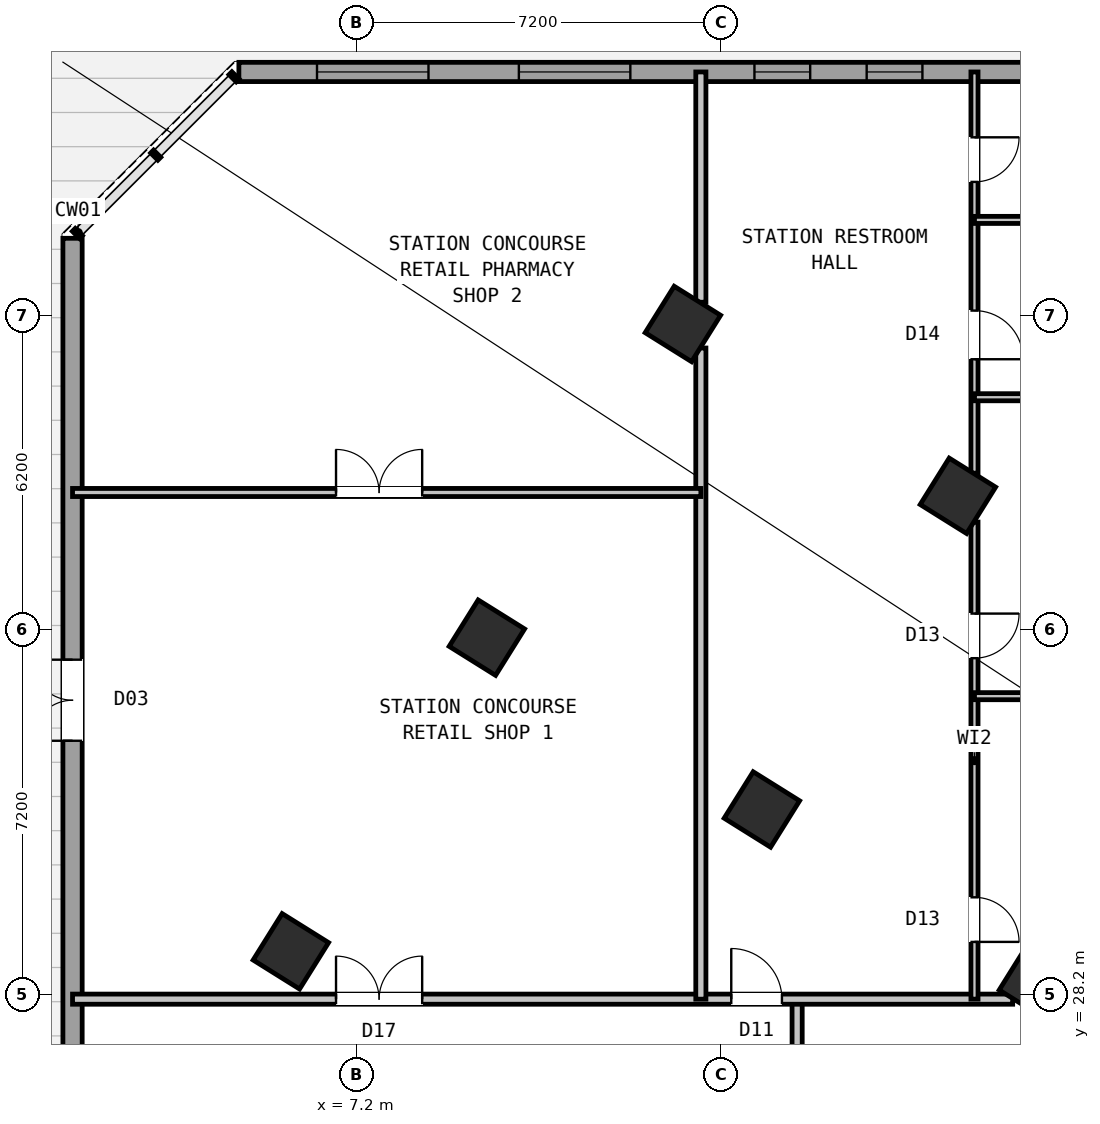
"""IFC4 building model, lengths in metres.
Left out: names, types, materials, properties, quantities, classifications, styles, units other than length and angle.
Written with IfcOpenShell. Run it as: python <this file> out.ifc"""

import sys

from ifc_helpers import new_model, si_unit, direction, frame, frame_2d, origin, origin_2d, place, context, subcontext, project, spatial, rectangle, hollow_rectangle, extrude, source, transform, mapped, element, fill, save


model = new_model("IFC4")
c1 = context("Model", 3, precision=1e-05, world=origin(), true_north=direction((0.0, 1.0)))
c2 = subcontext(c1, "Body", "Model", "MODEL_VIEW")
j1 = project(units=[si_unit("LENGTHUNIT", "METRE"), si_unit("PLANEANGLEUNIT", "RADIAN")], contexts=[c1])
p1 = place(None, origin())
s1 = spatial("IfcSite", under=j1, at=p1, CompositionType="ELEMENT")
p2 = place(p1, origin())
s2 = spatial("IfcBuilding", under=s1, at=p2, CompositionType="ELEMENT")
p3 = place(p2, origin())
s3 = spatial("IfcBuildingStorey", under=s2, at=p3, CompositionType="ELEMENT", Elevation=0.0)
m1 = source(origin(), c2, "Body", "SweptSolid", [
    extrude(hollow_rectangle(XDim=1.08, YDim=1.08, WallThickness=0.04, at=origin_2d()), origin(), (0.0, 0.0, 1.0), 5.4),
])
for number, where, z_axis, x_axis in (
    (1, (20.632, 28.452, 0.0), (0.0, 0.0, 1.0), (-0.848, 0.53, 0.0)),
    (2, (19.073, 38.034, 0.0), (0.0, 0.0, 1.0), (-0.848, 0.53, 0.0)),
    (3, (15.205, 31.844, 0.0), (0.0, 0.0, 1.0), (-0.848, 0.53, 0.0)),
    (4, (13.646, 41.426, 0.0), (0.0, 0.0, 1.0), (-0.848, 0.53, 0.0)),
    (5, (9.777, 35.235, 0.0), (0.0, 0.0, 1.0), (-0.848, 0.53, 0.0)),
    (6, (5.909, 29.044, 0.0), (0.0, 0.0, 1.0), (-0.848, 0.53, 0.0)),
):
    element("IfcColumn", number, at=place(p3, frame(where, z_axis=z_axis, x_axis=x_axis)), inside=s3, PredefinedType="COLUMN", context=c2, shape_type="MappedRepresentation", body=[
        mapped(m1, transform((0.0, 0.0, 0.0), scale=1.0)),
    ])
p4 = place(p3, frame((1.6, 4.883, 0.0), z_axis=(0.0, 0.0, 1.0), x_axis=(0.0, 1.0, 0.0)))
e7 = element("IfcWall", 7, at=p4, inside=s3, PredefinedType="STANDARD", context=c2, shape_type="SweptSolid", body=[
    extrude(rectangle(XDim=38.234, YDim=0.38, at=frame_2d((19.117, 0.0))), origin(), (0.0, 0.0, 1.0), 5.05),
])
p5 = place(p4, frame((16.617, 0.0, 0.0)))
e8 = element("IfcOpeningElement", 8, at=p5, cuts=e7, PredefinedType="OPENING", context=c2, shape_type="SweptSolid", body=[
    extrude(rectangle(XDim=2.2, YDim=2.6, at=frame_2d((1.1, 1.3))), frame((0.0, 0.2, 0.0), z_axis=(0.0, -1.0, 0.0), x_axis=(1.0, 0.0, 0.0)), (0.0, 0.0, 1.0), 0.4),
])
p6 = place(p4, frame((28.317, 0.0, 0.0)))
e9 = element("IfcOpeningElement", 9, at=p6, cuts=e7, PredefinedType="OPENING", context=c2, shape_type="SweptSolid", body=[
    extrude(rectangle(XDim=1.6, YDim=2.4, at=frame_2d((0.8, 1.2))), frame((0.0, 0.2, 0.0), z_axis=(0.0, -1.0, 0.0), x_axis=(1.0, 0.0, 0.0)), (0.0, 0.0, 1.0), 0.4),
])
p7 = place(p3, frame((4.883, 46.4, 0.0), z_axis=(0.0, 0.0, 1.0), x_axis=(1.0, 0.0, 0.0)))
e10 = element("IfcWall", 10, at=p7, inside=s3, PredefinedType="STANDARD", context=c2, shape_type="SweptSolid", body=[
    extrude(rectangle(XDim=62.234, YDim=0.38, at=frame_2d((31.117, 0.0))), origin(), (0.0, 0.0, 1.0), 5.05),
])
p8 = place(p7, frame((1.542, 0.0, 0.85)))
e11 = element("IfcOpeningElement", 11, at=p8, cuts=e10, PredefinedType="OPENING", context=c2, shape_type="SweptSolid", body=[
    extrude(rectangle(XDim=2.2, YDim=1.75, at=frame_2d((1.1, 0.875))), frame((0.0, 0.2, 0.0), z_axis=(0.0, -1.0, 0.0), x_axis=(1.0, 0.0, 0.0)), (0.0, 0.0, 1.0), 0.4),
])
p9 = place(p7, frame((5.525, 0.0, 0.85)))
e12 = element("IfcOpeningElement", 12, at=p9, cuts=e10, PredefinedType="OPENING", context=c2, shape_type="SweptSolid", body=[
    extrude(rectangle(XDim=2.2, YDim=1.75, at=frame_2d((1.1, 0.875))), frame((0.0, 0.2, 0.0), z_axis=(0.0, -1.0, 0.0), x_axis=(1.0, 0.0, 0.0)), (0.0, 0.0, 1.0), 0.4),
])
p10 = place(p7, frame((10.175, 0.0, 1.0)))
e13 = element("IfcOpeningElement", 13, at=p10, cuts=e10, PredefinedType="OPENING", context=c2, shape_type="SweptSolid", body=[
    extrude(rectangle(XDim=1.1, YDim=1.35, at=frame_2d((0.55, 0.675))), frame((0.0, 0.2, 0.0), z_axis=(0.0, -1.0, 0.0), x_axis=(1.0, 0.0, 0.0)), (0.0, 0.0, 1.0), 0.4),
])
p11 = place(p7, frame((12.39, 0.0, 1.0)))
e14 = element("IfcOpeningElement", 14, at=p11, cuts=e10, PredefinedType="OPENING", context=c2, shape_type="SweptSolid", body=[
    extrude(rectangle(XDim=1.1, YDim=1.35, at=frame_2d((0.55, 0.675))), frame((0.0, 0.2, 0.0), z_axis=(0.0, -1.0, 0.0), x_axis=(1.0, 0.0, 0.0)), (0.0, 0.0, 1.0), 0.4),
])
p12 = place(p7, frame((15.57, 0.0, 0.95)))
e15 = element("IfcOpeningElement", 15, at=p12, cuts=e10, PredefinedType="OPENING", context=c2, shape_type="SweptSolid", body=[
    extrude(rectangle(XDim=1.4, YDim=1.5, at=frame_2d((0.7, 0.75))), frame((0.0, 0.2, 0.0), z_axis=(0.0, -1.0, 0.0), x_axis=(1.0, 0.0, 0.0)), (0.0, 0.0, 1.0), 0.4),
])
p13 = place(p7, frame((18.135, 0.0, 0.95)))
e16 = element("IfcOpeningElement", 16, at=p13, cuts=e10, PredefinedType="OPENING", context=c2, shape_type="SweptSolid", body=[
    extrude(rectangle(XDim=1.4, YDim=1.5, at=frame_2d((0.7, 0.75))), frame((0.0, 0.2, 0.0), z_axis=(0.0, -1.0, 0.0), x_axis=(1.0, 0.0, 0.0)), (0.0, 0.0, 1.0), 0.4),
])
p14 = place(p7, frame((21.857, 0.0, 0.85)))
e17 = element("IfcOpeningElement", 17, at=p14, cuts=e10, PredefinedType="OPENING", context=c2, shape_type="SweptSolid", body=[
    extrude(rectangle(XDim=2.2, YDim=1.75, at=frame_2d((1.1, 0.875))), frame((0.0, 0.2, 0.0), z_axis=(0.0, -1.0, 0.0), x_axis=(1.0, 0.0, 0.0)), (0.0, 0.0, 1.0), 0.4),
])
p15 = place(p7, frame((25.535, 0.0, 0.85)))
e18 = element("IfcOpeningElement", 18, at=p15, cuts=e10, PredefinedType="OPENING", context=c2, shape_type="SweptSolid", body=[
    extrude(rectangle(XDim=2.2, YDim=1.75, at=frame_2d((1.1, 0.875))), frame((0.0, 0.2, 0.0), z_axis=(0.0, -1.0, 0.0), x_axis=(1.0, 0.0, 0.0)), (0.0, 0.0, 1.0), 0.4),
])
p16 = place(p7, frame((29.214, 0.0, 0.85)))
e19 = element("IfcOpeningElement", 19, at=p16, cuts=e10, PredefinedType="OPENING", context=c2, shape_type="SweptSolid", body=[
    extrude(rectangle(XDim=2.2, YDim=1.75, at=frame_2d((1.1, 0.875))), frame((0.0, 0.2, 0.0), z_axis=(0.0, -1.0, 0.0), x_axis=(1.0, 0.0, 0.0)), (0.0, 0.0, 1.0), 0.4),
])
p17 = place(p7, frame((32.893, 0.0, 0.85)))
e20 = element("IfcOpeningElement", 20, at=p17, cuts=e10, PredefinedType="OPENING", context=c2, shape_type="SweptSolid", body=[
    extrude(rectangle(XDim=2.2, YDim=1.75, at=frame_2d((1.1, 0.875))), frame((0.0, 0.2, 0.0), z_axis=(0.0, -1.0, 0.0), x_axis=(1.0, 0.0, 0.0)), (0.0, 0.0, 1.0), 0.4),
])
p18 = place(p7, frame((36.572, 0.0, 0.85)))
e21 = element("IfcOpeningElement", 21, at=p18, cuts=e10, PredefinedType="OPENING", context=c2, shape_type="SweptSolid", body=[
    extrude(rectangle(XDim=2.2, YDim=1.75, at=frame_2d((1.1, 0.875))), frame((0.0, 0.2, 0.0), z_axis=(0.0, -1.0, 0.0), x_axis=(1.0, 0.0, 0.0)), (0.0, 0.0, 1.0), 0.4),
])
p19 = place(p7, frame((40.251, 0.0, 0.85)))
e22 = element("IfcOpeningElement", 22, at=p19, cuts=e10, PredefinedType="OPENING", context=c2, shape_type="SweptSolid", body=[
    extrude(rectangle(XDim=2.2, YDim=1.75, at=frame_2d((1.1, 0.875))), frame((0.0, 0.2, 0.0), z_axis=(0.0, -1.0, 0.0), x_axis=(1.0, 0.0, 0.0)), (0.0, 0.0, 1.0), 0.4),
])
p20 = place(p7, frame((43.93, 0.0, 0.85)))
e23 = element("IfcOpeningElement", 23, at=p20, cuts=e10, PredefinedType="OPENING", context=c2, shape_type="SweptSolid", body=[
    extrude(rectangle(XDim=2.2, YDim=1.75, at=frame_2d((1.1, 0.875))), frame((0.0, 0.2, 0.0), z_axis=(0.0, -1.0, 0.0), x_axis=(1.0, 0.0, 0.0)), (0.0, 0.0, 1.0), 0.4),
])
p21 = place(p7, frame((47.608, 0.0, 0.85)))
e24 = element("IfcOpeningElement", 24, at=p21, cuts=e10, PredefinedType="OPENING", context=c2, shape_type="SweptSolid", body=[
    extrude(rectangle(XDim=2.2, YDim=1.75, at=frame_2d((1.1, 0.875))), frame((0.0, 0.2, 0.0), z_axis=(0.0, -1.0, 0.0), x_axis=(1.0, 0.0, 0.0)), (0.0, 0.0, 1.0), 0.4),
])
p22 = place(p7, frame((51.287, 0.0, 0.85)))
e25 = element("IfcOpeningElement", 25, at=p22, cuts=e10, PredefinedType="OPENING", context=c2, shape_type="SweptSolid", body=[
    extrude(rectangle(XDim=2.2, YDim=1.75, at=frame_2d((1.1, 0.875))), frame((0.0, 0.2, 0.0), z_axis=(0.0, -1.0, 0.0), x_axis=(1.0, 0.0, 0.0)), (0.0, 0.0, 1.0), 0.4),
])
p23 = place(p7, frame((54.966, 0.0, 0.85)))
e26 = element("IfcOpeningElement", 26, at=p23, cuts=e10, PredefinedType="OPENING", context=c2, shape_type="SweptSolid", body=[
    extrude(rectangle(XDim=2.2, YDim=1.75, at=frame_2d((1.1, 0.875))), frame((0.0, 0.2, 0.0), z_axis=(0.0, -1.0, 0.0), x_axis=(1.0, 0.0, 0.0)), (0.0, 0.0, 1.0), 0.4),
])
p24 = place(p7, frame((58.645, 0.0, 0.85)))
e27 = element("IfcOpeningElement", 27, at=p24, cuts=e10, PredefinedType="OPENING", context=c2, shape_type="SweptSolid", body=[
    extrude(rectangle(XDim=2.2, YDim=1.75, at=frame_2d((1.1, 0.875))), frame((0.0, 0.2, 0.0), z_axis=(0.0, -1.0, 0.0), x_axis=(1.0, 0.0, 0.0)), (0.0, 0.0, 1.0), 0.4),
])
p25 = place(p3, frame((15.9, 16.3, 0.0), z_axis=(0.0, 0.0, 1.0), x_axis=(0.0, 1.0, 0.0)))
e28 = element("IfcWall", 28, at=p25, inside=s3, PredefinedType="STANDARD", context=c2, shape_type="SweptSolid", body=[
    extrude(rectangle(XDim=11.8, YDim=0.2, at=frame_2d((5.9, 0.0))), origin(), (0.0, 0.0, 1.0), 5.04),
])
p26 = place(p25, frame((1.6, 0.0, 0.0)))
e29 = element("IfcOpeningElement", 29, at=p26, cuts=e28, PredefinedType="OPENING", context=c2, shape_type="SweptSolid", body=[
    extrude(rectangle(XDim=1.15, YDim=2.1, at=frame_2d((0.575, 1.05))), frame((0.0, 0.11, 0.0), z_axis=(0.0, -1.0, 0.0), x_axis=(1.0, 0.0, 0.0)), (0.0, 0.0, 1.0), 0.22),
])
p27 = place(p25, frame((7.0, 0.0, 0.0)))
e30 = element("IfcOpeningElement", 30, at=p27, cuts=e28, PredefinedType="OPENING", context=c2, shape_type="SweptSolid", body=[
    extrude(rectangle(XDim=1.4, YDim=2.15, at=frame_2d((0.7, 1.075))), frame((0.0, 0.11, 0.0), z_axis=(0.0, -1.0, 0.0), x_axis=(1.0, 0.0, 0.0)), (0.0, 0.0, 1.0), 0.22),
])
p28 = place(p3, frame((1.6, 28.1, 0.0), z_axis=(0.0, 0.0, 1.0), x_axis=(1.0, 0.0, 0.0)))
e31 = element("IfcWall", 31, at=p28, inside=s3, PredefinedType="STANDARD", context=c2, shape_type="SweptSolid", body=[
    extrude(rectangle(XDim=18.554, YDim=0.2, at=frame_2d((9.277, 0.0))), origin(), (0.0, 0.0, 1.0), 5.04),
])
p29 = place(p28, frame((5.2, 0.0, 0.0)))
e32 = element("IfcOpeningElement", 32, at=p29, cuts=e31, PredefinedType="OPENING", context=c2, shape_type="SweptSolid", body=[
    extrude(rectangle(XDim=1.7, YDim=2.2, at=frame_2d((0.85, 1.1))), frame((0.0, 0.11, 0.0), z_axis=(0.0, -1.0, 0.0), x_axis=(1.0, 0.0, 0.0)), (0.0, 0.0, 1.0), 0.22),
])
p30 = place(p28, frame((13.0, 0.0, 0.0)))
e33 = element("IfcOpeningElement", 33, at=p30, cuts=e31, PredefinedType="OPENING", context=c2, shape_type="SweptSolid", body=[
    extrude(rectangle(XDim=1.0, YDim=2.1, at=frame_2d((0.5, 1.05))), frame((0.0, 0.11, 0.0), z_axis=(0.0, -1.0, 0.0), x_axis=(1.0, 0.0, 0.0)), (0.0, 0.0, 1.0), 0.22),
])
p31 = place(p3, frame((14.0, 28.1, 0.0), z_axis=(0.0, 0.0, 1.0), x_axis=(0.0, 1.0, 0.0)))
e34 = element("IfcWall", 34, at=p31, inside=s3, PredefinedType="STANDARD", context=c2, shape_type="SweptSolid", body=[
    extrude(rectangle(XDim=12.852, YDim=0.2, at=frame_2d((6.426, 0.0))), origin(), (0.0, 0.0, 1.0), 5.04),
])
p32 = place(p3, frame((14.0, 41.855, 0.0), z_axis=(0.0, 0.0, 1.0), x_axis=(0.0, 1.0, 0.0)))
e35 = element("IfcWall", 35, at=p32, inside=s3, PredefinedType="STANDARD", context=c2, shape_type="SweptSolid", body=[
    extrude(rectangle(XDim=4.545, YDim=0.2, at=frame_2d((2.272, 0.0))), origin(), (0.0, 0.0, 1.0), 5.04),
])
p33 = place(p3, frame((1.6, 38.1, 0.0), z_axis=(0.0, 0.0, 1.0), x_axis=(1.0, 0.0, 0.0)))
e36 = element("IfcWall", 36, at=p33, inside=s3, PredefinedType="PARTITIONING", context=c2, shape_type="SweptSolid", body=[
    extrude(rectangle(XDim=12.4, YDim=0.16, at=frame_2d((6.2, 0.0))), origin(), (0.0, 0.0, 1.0), 5.04),
])
p34 = place(p33, frame((5.2, 0.0, 0.0)))
e37 = element("IfcOpeningElement", 37, at=p34, cuts=e36, PredefinedType="OPENING", context=c2, shape_type="SweptSolid", body=[
    extrude(rectangle(XDim=1.7, YDim=2.2, at=frame_2d((0.85, 1.1))), frame((0.0, 0.09, 0.0), z_axis=(0.0, -1.0, 0.0), x_axis=(1.0, 0.0, 0.0)), (0.0, 0.0, 1.0), 0.18),
])
p35 = place(p3, frame((19.4, 28.1, 0.0), z_axis=(0.0, 0.0, 1.0), x_axis=(0.0, 1.0, 0.0)))
e38 = element("IfcWall", 38, at=p35, inside=s3, PredefinedType="PLUMBINGWALL", context=c2, shape_type="SweptSolid", body=[
    extrude(rectangle(XDim=9.416, YDim=0.14, at=frame_2d((4.708, 0.0))), origin(), (0.0, 0.0, 1.0), 5.04),
])
p36 = place(p35, frame((1.13, 0.0, 0.0)))
e39 = element("IfcOpeningElement", 39, at=p36, cuts=e38, PredefinedType="OPENING", context=c2, shape_type="SweptSolid", body=[
    extrude(rectangle(XDim=0.88, YDim=2.08, at=frame_2d((0.44, 1.04))), frame((0.0, 0.08, 0.0), z_axis=(0.0, -1.0, 0.0), x_axis=(1.0, 0.0, 0.0)), (0.0, 0.0, 1.0), 0.16),
])
p37 = place(p35, frame((6.73, 0.0, 0.0)))
e40 = element("IfcOpeningElement", 40, at=p37, cuts=e38, PredefinedType="OPENING", context=c2, shape_type="SweptSolid", body=[
    extrude(rectangle(XDim=0.88, YDim=2.08, at=frame_2d((0.44, 1.04))), frame((0.0, 0.08, 0.0), z_axis=(0.0, -1.0, 0.0), x_axis=(1.0, 0.0, 0.0)), (0.0, 0.0, 1.0), 0.16),
])
p38 = place(p3, frame((19.4, 38.481, 0.0), z_axis=(0.0, 0.0, 1.0), x_axis=(0.0, 1.0, 0.0)))
e41 = element("IfcWall", 41, at=p38, inside=s3, PredefinedType="PLUMBINGWALL", context=c2, shape_type="SweptSolid", body=[
    extrude(rectangle(XDim=7.919, YDim=0.14, at=frame_2d((3.959, 0.0))), origin(), (0.0, 0.0, 1.0), 5.04),
])
p39 = place(p38, frame((2.249, 0.0, 0.0)))
e42 = element("IfcOpeningElement", 42, at=p39, cuts=e41, PredefinedType="OPENING", context=c2, shape_type="SweptSolid", body=[
    extrude(rectangle(XDim=0.96, YDim=2.08, at=frame_2d((0.48, 1.04))), frame((0.0, 0.08, 0.0), z_axis=(0.0, -1.0, 0.0), x_axis=(1.0, 0.0, 0.0)), (0.0, 0.0, 1.0), 0.16),
])
p40 = place(p38, frame((5.749, 0.0, 0.0)))
e43 = element("IfcOpeningElement", 43, at=p40, cuts=e41, PredefinedType="OPENING", context=c2, shape_type="SweptSolid", body=[
    extrude(rectangle(XDim=0.88, YDim=2.08, at=frame_2d((0.44, 1.04))), frame((0.0, 0.08, 0.0), z_axis=(0.0, -1.0, 0.0), x_axis=(1.0, 0.0, 0.0)), (0.0, 0.0, 1.0), 0.16),
])
p41 = place(p3, frame((19.4, 34.08, 0.0), z_axis=(0.0, 0.0, 1.0), x_axis=(1.0, 0.0, 0.0)))
e44 = element("IfcWall", 44, at=p41, inside=s3, PredefinedType="PLUMBINGWALL", context=c2, shape_type="SweptSolid", body=[
    extrude(rectangle(XDim=4.96, YDim=0.14, at=frame_2d((2.48, 0.0))), origin(), (0.0, 0.0, 1.0), 5.04),
])
for number, where, z_axis, x_axis in (
    (45, (19.4, 39.98, 0.0), (0.0, 0.0, 1.0), (1.0, 0.0, 0.0)),
    (46, (19.4, 43.48, 0.0), (0.0, 0.0, 1.0), (1.0, 0.0, 0.0)),
):
    element("IfcWall", number, at=place(p3, frame(where, z_axis=z_axis, x_axis=x_axis)), inside=s3, PredefinedType="PLUMBINGWALL", context=c2, shape_type="SweptSolid", body=[
        extrude(rectangle(XDim=6.1, YDim=0.14, at=frame_2d((3.05, 0.0))), origin(), (0.0, 0.0, 1.0), 5.04),
    ])
m2 = source(origin(), c2, "Body", "SweptSolid", [
    extrude(rectangle(XDim=1.6, YDim=2.4, at=frame_2d((0.8, 1.2))), frame((0.0, 0.025, 0.0), z_axis=(0.0, -1.0, 0.0), x_axis=(1.0, 0.0, 0.0)), (0.0, 0.0, 1.0), 0.05),
])
p42 = place(p6, origin())
e47 = element("IfcDoor", 47, at=p42, inside=s3, OperationType="DOUBLE_DOOR_SINGLE_SWING", PredefinedType="DOOR", context=c2, shape_type="MappedRepresentation", body=[
    mapped(m2, transform((0.0, 0.0, 0.0), scale=1.0)),
])
fill(e9, e47)
m3 = source(origin(), c2, "Body", "SweptSolid", [
    extrude(rectangle(XDim=2.2, YDim=1.75, at=frame_2d((1.1, 0.875))), frame((0.0, 0.03, 0.0), z_axis=(0.0, -1.0, 0.0), x_axis=(1.0, 0.0, 0.0)), (0.0, 0.0, 1.0), 0.06),
])
p43 = place(p8, origin())
e48 = element("IfcWindow", 48, at=p43, inside=s3, PartitioningType="SINGLE_PANEL", PredefinedType="WINDOW", context=c2, shape_type="MappedRepresentation", body=[
    mapped(m3, transform((0.0, 0.0, 0.0), scale=1.0)),
])
fill(e11, e48)
p44 = place(p9, origin())
e49 = element("IfcWindow", 49, at=p44, inside=s3, PartitioningType="SINGLE_PANEL", PredefinedType="WINDOW", context=c2, shape_type="MappedRepresentation", body=[
    mapped(m3, transform((0.0, 0.0, 0.0), scale=1.0)),
])
fill(e12, e49)
m4 = source(origin(), c2, "Body", "SweptSolid", [
    extrude(rectangle(XDim=1.1, YDim=1.35, at=frame_2d((0.55, 0.675))), frame((0.0, 0.03, 0.0), z_axis=(0.0, -1.0, 0.0), x_axis=(1.0, 0.0, 0.0)), (0.0, 0.0, 1.0), 0.06),
])
p45 = place(p10, origin())
e50 = element("IfcWindow", 50, at=p45, inside=s3, PartitioningType="SINGLE_PANEL", PredefinedType="WINDOW", context=c2, shape_type="MappedRepresentation", body=[
    mapped(m4, transform((0.0, 0.0, 0.0), scale=1.0)),
])
fill(e13, e50)
p46 = place(p11, origin())
e51 = element("IfcWindow", 51, at=p46, inside=s3, PartitioningType="SINGLE_PANEL", PredefinedType="WINDOW", context=c2, shape_type="MappedRepresentation", body=[
    mapped(m4, transform((0.0, 0.0, 0.0), scale=1.0)),
])
fill(e14, e51)
m5 = source(origin(), c2, "Body", "SweptSolid", [
    extrude(rectangle(XDim=1.7, YDim=2.2, at=frame_2d((0.85, 1.1))), frame((0.0, 0.025, 0.0), z_axis=(0.0, -1.0, 0.0), x_axis=(1.0, 0.0, 0.0)), (0.0, 0.0, 1.0), 0.05),
])
p47 = place(p29, origin())
e52 = element("IfcDoor", 52, at=p47, inside=s3, OperationType="DOUBLE_DOOR_SINGLE_SWING", PredefinedType="DOOR", context=c2, shape_type="MappedRepresentation", body=[
    mapped(m5, transform((0.0, 0.0, 0.0), scale=1.0)),
])
fill(e32, e52)
p48 = place(p34, origin())
e53 = element("IfcDoor", 53, at=p48, inside=s3, OperationType="DOUBLE_DOOR_SINGLE_SWING", PredefinedType="DOOR", context=c2, shape_type="MappedRepresentation", body=[
    mapped(m5, transform((0.0, 0.0, 0.0), scale=1.0)),
])
fill(e37, e53)
m6 = source(origin(), c2, "Body", "SweptSolid", [
    extrude(rectangle(XDim=1.0, YDim=2.1, at=frame_2d((0.5, 1.05))), frame((0.0, 0.025, 0.0), z_axis=(0.0, -1.0, 0.0), x_axis=(1.0, 0.0, 0.0)), (0.0, 0.0, 1.0), 0.05),
])
p49 = place(p30, origin())
e54 = element("IfcDoor", 54, at=p49, inside=s3, OperationType="SINGLE_SWING_LEFT", PredefinedType="DOOR", context=c2, shape_type="MappedRepresentation", body=[
    mapped(m6, transform((0.0, 0.0, 0.0), scale=1.0)),
])
fill(e33, e54)
m7 = source(origin(), c2, "Body", "SweptSolid", [
    extrude(rectangle(XDim=0.88, YDim=2.08, at=frame_2d((0.44, 1.04))), frame((0.0, 0.025, 0.0), z_axis=(0.0, -1.0, 0.0), x_axis=(1.0, 0.0, 0.0)), (0.0, 0.0, 1.0), 0.05),
])
p50 = place(p36, frame((0.88, 0.0, 0.0), z_axis=(0.0, 0.0, 1.0), x_axis=(-1.0, 0.0, 0.0)))
e55 = element("IfcDoor", 55, at=p50, inside=s3, OperationType="SINGLE_SWING_RIGHT", PredefinedType="DOOR", context=c2, shape_type="MappedRepresentation", body=[
    mapped(m7, transform((0.0, 0.0, 0.0), scale=1.0)),
])
fill(e39, e55)
p51 = place(p37, frame((0.88, 0.0, 0.0), z_axis=(0.0, 0.0, 1.0), x_axis=(-1.0, 0.0, 0.0)))
e56 = element("IfcDoor", 56, at=p51, inside=s3, OperationType="SINGLE_SWING_LEFT", PredefinedType="DOOR", context=c2, shape_type="MappedRepresentation", body=[
    mapped(m7, transform((0.0, 0.0, 0.0), scale=1.0)),
])
fill(e40, e56)
m8 = source(origin(), c2, "Body", "SweptSolid", [
    extrude(rectangle(XDim=0.96, YDim=2.08, at=frame_2d((0.48, 1.04))), frame((0.0, 0.025, 0.0), z_axis=(0.0, -1.0, 0.0), x_axis=(1.0, 0.0, 0.0)), (0.0, 0.0, 1.0), 0.05),
])
p52 = place(p39, frame((0.96, 0.0, 0.0), z_axis=(0.0, 0.0, 1.0), x_axis=(-1.0, 0.0, 0.0)))
e57 = element("IfcDoor", 57, at=p52, inside=s3, OperationType="SINGLE_SWING_RIGHT", PredefinedType="DOOR", context=c2, shape_type="MappedRepresentation", body=[
    mapped(m8, transform((0.0, 0.0, 0.0), scale=1.0)),
])
fill(e42, e57)
p53 = place(p40, frame((0.88, 0.0, 0.0), z_axis=(0.0, 0.0, 1.0), x_axis=(-1.0, 0.0, 0.0)))
e58 = element("IfcDoor", 58, at=p53, inside=s3, OperationType="SINGLE_SWING_LEFT", PredefinedType="DOOR", context=c2, shape_type="MappedRepresentation", body=[
    mapped(m7, transform((0.0, 0.0, 0.0), scale=1.0)),
])
fill(e43, e58)
save(model, sys.argv[1])
